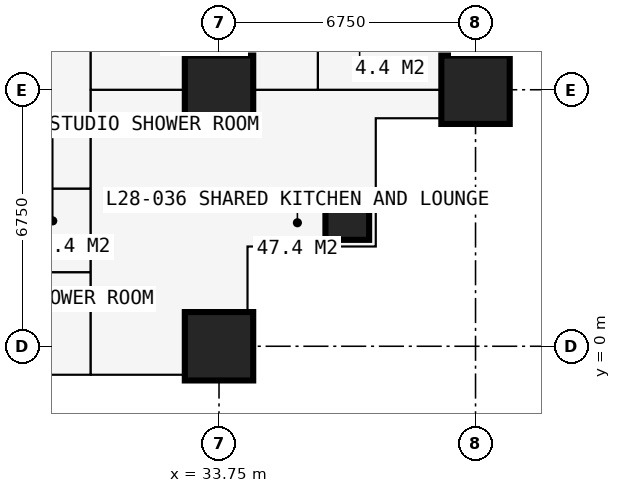
"""IFC4 building model, lengths in metres.
Left out: names, types, materials, properties, quantities, classifications, styles, units other than length and angle.
Written with IfcOpenShell. Run it as: python <this file> out.ifc"""

import sys

from ifc_helpers import new_model, si_unit, direction, frame, frame_2d, origin, origin_2d, place, context, subcontext, project, spatial, rectangle, extrude, element, fill, save


model = new_model("IFC4")
c1 = context("Model", 3, precision=1e-05, world=origin(), true_north=direction((0.0, 1.0)))
c2 = subcontext(c1, "Body", "Model", "MODEL_VIEW")
j1 = project(units=[si_unit("LENGTHUNIT", "METRE"), si_unit("PLANEANGLEUNIT", "RADIAN")], contexts=[c1])
p1 = place(None, origin())
s1 = spatial("IfcSite", under=j1, at=p1, CompositionType="ELEMENT")
p2 = place(p1, origin())
s2 = spatial("IfcBuilding", under=s1, at=p2, CompositionType="ELEMENT")
p3 = place(p2, frame((0.0, 0.0, 105.3)))
s3 = spatial("IfcBuildingStorey", under=s2, at=p3, CompositionType="ELEMENT", Elevation=105.3)
for number, where, z_axis, x_axis in (
    (1, (33.75, 0.0, 0.0), (0.0, 0.0, 1.0), (1.0, 0.0, 0.0)),
    (2, (33.75, 6.75, 0.0), (0.0, 0.0, 1.0), (1.0, 0.0, 0.0)),
):
    element("IfcColumn", number, at=place(p3, frame(where, z_axis=z_axis, x_axis=x_axis)), inside=s3, PredefinedType="COLUMN", context=c2, shape_type="SweptSolid", body=[
        extrude(rectangle(XDim=1.8, YDim=1.8, at=origin_2d()), origin(), (0.0, 0.0, 1.0), 3.6),
    ])
p4 = place(p3, frame((37.125, 3.375, 0.0), z_axis=(0.0, 0.0, 1.0), x_axis=(1.0, 0.0, 0.0)))
e3 = element("IfcColumn", 3, at=p4, inside=s3, PredefinedType="COLUMN", context=c2, shape_type="SweptSolid", body=[
    extrude(rectangle(XDim=1.15, YDim=1.15, at=origin_2d()), origin(), (0.0, 0.0, 1.0), 3.6),
])
p5 = place(p3, frame((40.5, 6.75, 0.0), z_axis=(0.0, 0.0, 1.0), x_axis=(1.0, 0.0, 0.0)))
e4 = element("IfcColumn", 4, at=p5, inside=s3, PredefinedType="COLUMN", context=c2, shape_type="SweptSolid", body=[
    extrude(rectangle(XDim=1.8, YDim=1.8, at=origin_2d()), origin(), (0.0, 0.0, 1.0), 3.6),
])
p6 = place(p3, frame((34.5, -0.75, 0.0), z_axis=(0.0, 0.0, 1.0), x_axis=(0.0, 1.0, 0.0)))
e5 = element("IfcWall", 5, at=p6, inside=s3, PredefinedType="SOLIDWALL", context=c2, shape_type="SweptSolid", body=[
    extrude(rectangle(XDim=3.375, YDim=0.3, at=frame_2d((1.688, 0.0))), origin(), (0.0, 0.0, 1.0), 3.375),
])
p7 = place(p6, frame((1.833, 0.0, 0.9)))
e6 = element("IfcOpeningElement", 6, at=p7, cuts=e5, PredefinedType="OPENING", context=c2, shape_type="SweptSolid", body=[
    extrude(rectangle(XDim=1.2, YDim=1.8, at=frame_2d((0.6, 0.9))), frame((0.0, 0.16, 0.0), z_axis=(0.0, -1.0, 0.0), x_axis=(1.0, 0.0, 0.0)), (0.0, 0.0, 1.0), 0.32),
])
p8 = place(p3, frame((34.5, 2.625, 0.0), z_axis=(0.0, 0.0, 1.0), x_axis=(1.0, 0.0, 0.0)))
e7 = element("IfcWall", 7, at=p8, inside=s3, PredefinedType="SOLIDWALL", context=c2, shape_type="SweptSolid", body=[
    extrude(rectangle(XDim=3.375, YDim=0.3, at=frame_2d((1.688, 0.0))), origin(), (0.0, 0.0, 1.0), 3.375),
])
p9 = place(p8, frame((0.788, 0.0, 0.6)))
e8 = element("IfcOpeningElement", 8, at=p9, cuts=e7, PredefinedType="OPENING", context=c2, shape_type="SweptSolid", body=[
    extrude(rectangle(XDim=1.8, YDim=2.1, at=frame_2d((0.9, 1.05))), frame((0.0, 0.16, 0.0), z_axis=(0.0, -1.0, 0.0), x_axis=(1.0, 0.0, 0.0)), (0.0, 0.0, 1.0), 0.32),
])
p10 = place(p3, frame((37.875, 2.625, 0.0), z_axis=(0.0, 0.0, 1.0), x_axis=(0.0, 1.0, 0.0)))
e9 = element("IfcWall", 9, at=p10, inside=s3, PredefinedType="SOLIDWALL", context=c2, shape_type="SweptSolid", body=[
    extrude(rectangle(XDim=3.375, YDim=0.3, at=frame_2d((1.688, 0.0))), origin(), (0.0, 0.0, 1.0), 3.375),
])
p11 = place(p10, frame((0.788, 0.0, 0.6)))
e10 = element("IfcOpeningElement", 10, at=p11, cuts=e9, PredefinedType="OPENING", context=c2, shape_type="SweptSolid", body=[
    extrude(rectangle(XDim=1.8, YDim=2.1, at=frame_2d((0.9, 1.05))), frame((0.0, 0.16, 0.0), z_axis=(0.0, -1.0, 0.0), x_axis=(1.0, 0.0, 0.0)), (0.0, 0.0, 1.0), 0.32),
])
p12 = place(p3, frame((37.875, 6.0, 0.0), z_axis=(0.0, 0.0, 1.0), x_axis=(1.0, 0.0, 0.0)))
e11 = element("IfcWall", 11, at=p12, inside=s3, PredefinedType="SOLIDWALL", context=c2, shape_type="SweptSolid", body=[
    extrude(rectangle(XDim=3.375, YDim=0.3, at=frame_2d((1.688, 0.0))), origin(), (0.0, 0.0, 1.0), 3.375),
])
p13 = place(p12, frame((0.343, 0.0, 0.9)))
e12 = element("IfcOpeningElement", 12, at=p13, cuts=e11, PredefinedType="OPENING", context=c2, shape_type="SweptSolid", body=[
    extrude(rectangle(XDim=1.2, YDim=1.8, at=frame_2d((0.6, 0.9))), frame((0.0, 0.16, 0.0), z_axis=(0.0, -1.0, 0.0), x_axis=(1.0, 0.0, 0.0)), (0.0, 0.0, 1.0), 0.32),
])
p14 = place(p3, frame((6.75, 4.15, 0.0), z_axis=(0.0, 0.0, 1.0), x_axis=(1.0, 0.0, 0.0)))
e13 = element("IfcWall", 13, at=p14, inside=s3, PredefinedType="PARTITIONING", context=c2, shape_type="SweptSolid", body=[
    extrude(rectangle(XDim=23.625, YDim=0.1, at=frame_2d((11.812, 0.0))), origin(), (0.0, 0.0, 1.0), 3.375),
])
p15 = place(p14, frame((0.2, 0.0, 0.0)))
e14 = element("IfcOpeningElement", 14, at=p15, cuts=e13, PredefinedType="OPENING", context=c2, shape_type="SweptSolid", body=[
    extrude(rectangle(XDim=0.95, YDim=2.2, at=frame_2d((0.475, 1.1))), frame((0.0, 0.06, 0.0), z_axis=(0.0, -1.0, 0.0), x_axis=(1.0, 0.0, 0.0)), (0.0, 0.0, 1.0), 0.12),
])
p16 = place(p14, frame((3.625, 0.0, 0.0)))
e15 = element("IfcOpeningElement", 15, at=p16, cuts=e13, PredefinedType="OPENING", context=c2, shape_type="SweptSolid", body=[
    extrude(rectangle(XDim=0.95, YDim=2.2, at=frame_2d((0.475, 1.1))), frame((0.0, 0.06, 0.0), z_axis=(0.0, -1.0, 0.0), x_axis=(1.0, 0.0, 0.0)), (0.0, 0.0, 1.0), 0.12),
])
p17 = place(p14, frame((6.95, 0.0, 0.0)))
e16 = element("IfcOpeningElement", 16, at=p17, cuts=e13, PredefinedType="OPENING", context=c2, shape_type="SweptSolid", body=[
    extrude(rectangle(XDim=0.95, YDim=2.2, at=frame_2d((0.475, 1.1))), frame((0.0, 0.06, 0.0), z_axis=(0.0, -1.0, 0.0), x_axis=(1.0, 0.0, 0.0)), (0.0, 0.0, 1.0), 0.12),
])
p18 = place(p14, frame((10.375, 0.0, 0.0)))
e17 = element("IfcOpeningElement", 17, at=p18, cuts=e13, PredefinedType="OPENING", context=c2, shape_type="SweptSolid", body=[
    extrude(rectangle(XDim=0.95, YDim=2.2, at=frame_2d((0.475, 1.1))), frame((0.0, 0.06, 0.0), z_axis=(0.0, -1.0, 0.0), x_axis=(1.0, 0.0, 0.0)), (0.0, 0.0, 1.0), 0.12),
])
p19 = place(p14, frame((13.75, 0.0, 0.0)))
e18 = element("IfcOpeningElement", 18, at=p19, cuts=e13, PredefinedType="OPENING", context=c2, shape_type="SweptSolid", body=[
    extrude(rectangle(XDim=0.95, YDim=2.2, at=frame_2d((0.475, 1.1))), frame((0.0, 0.06, 0.0), z_axis=(0.0, -1.0, 0.0), x_axis=(1.0, 0.0, 0.0)), (0.0, 0.0, 1.0), 0.12),
])
p20 = place(p14, frame((17.125, 0.0, 0.0)))
e19 = element("IfcOpeningElement", 19, at=p20, cuts=e13, PredefinedType="OPENING", context=c2, shape_type="SweptSolid", body=[
    extrude(rectangle(XDim=0.95, YDim=2.2, at=frame_2d((0.475, 1.1))), frame((0.0, 0.06, 0.0), z_axis=(0.0, -1.0, 0.0), x_axis=(1.0, 0.0, 0.0)), (0.0, 0.0, 1.0), 0.12),
])
p21 = place(p14, frame((20.5, 0.0, 0.0)))
e20 = element("IfcOpeningElement", 20, at=p21, cuts=e13, PredefinedType="OPENING", context=c2, shape_type="SweptSolid", body=[
    extrude(rectangle(XDim=0.95, YDim=2.2, at=frame_2d((0.475, 1.1))), frame((0.0, 0.06, 0.0), z_axis=(0.0, -1.0, 0.0), x_axis=(1.0, 0.0, 0.0)), (0.0, 0.0, 1.0), 0.12),
])
p22 = place(p3, frame((22.988, 5.65, 0.0), z_axis=(0.0, 0.0, 1.0), x_axis=(1.0, 0.0, 0.0)))
e21 = element("IfcWall", 21, at=p22, inside=s3, PredefinedType="PARTITIONING", context=c2, shape_type="SweptSolid", body=[
    extrude(rectangle(XDim=7.387, YDim=0.15, at=frame_2d((3.694, 0.0))), origin(), (0.0, 0.0, 1.0), 3.375),
])
p23 = place(p22, frame((2.15, 0.0, 0.0)))
e22 = element("IfcOpeningElement", 22, at=p23, cuts=e21, PredefinedType="OPENING", context=c2, shape_type="SweptSolid", body=[
    extrude(rectangle(XDim=0.95, YDim=2.2, at=frame_2d((0.475, 1.1))), frame((0.0, 0.085, 0.0), z_axis=(0.0, -1.0, 0.0), x_axis=(1.0, 0.0, 0.0)), (0.0, 0.0, 1.0), 0.17),
])
p24 = place(p3, frame((28.375, 1.95, 0.0), z_axis=(0.0, 0.0, 1.0), x_axis=(1.0, 0.0, 0.0)))
e23 = element("IfcWall", 23, at=p24, inside=s3, PredefinedType="PARTITIONING", context=c2, shape_type="SweptSolid", body=[
    extrude(rectangle(XDim=2.0, YDim=0.1, at=frame_2d((1.0, 0.0))), origin(), (0.0, 0.0, 1.0), 3.375),
])
p25 = place(p3, frame((30.375, -0.734, 0.0), z_axis=(0.0, 0.0, 1.0), x_axis=(0.0, 1.0, 0.0)))
e24 = element("IfcWall", 24, at=p25, inside=s3, PredefinedType="PARTITIONING", context=c2, shape_type="SweptSolid", body=[
    extrude(rectangle(XDim=12.034, YDim=0.15, at=frame_2d((6.017, 0.0))), origin(), (0.0, 0.0, 1.0), 3.375),
])
p26 = place(p3, frame((30.375, 6.75, 0.0), z_axis=(0.0, 0.0, 1.0), x_axis=(1.0, 0.0, 0.0)))
e25 = element("IfcWall", 25, at=p26, inside=s3, PredefinedType="PARTITIONING", context=c2, shape_type="SweptSolid", body=[
    extrude(rectangle(XDim=10.859, YDim=0.15, at=frame_2d((5.429, 0.0))), origin(), (0.0, 0.0, 1.0), 2.877),
])
p27 = place(p26, frame((1.45, 0.0, 0.0)))
e26 = element("IfcOpeningElement", 26, at=p27, cuts=e25, PredefinedType="OPENING", context=c2, shape_type="SweptSolid", body=[
    extrude(rectangle(XDim=1.0, YDim=2.2, at=frame_2d((0.5, 1.1))), frame((0.0, 0.085, 0.0), z_axis=(0.0, -1.0, 0.0), x_axis=(1.0, 0.0, 0.0)), (0.0, 0.0, 1.0), 0.17),
])
p28 = place(p3, frame((36.35, 6.75, 0.0), z_axis=(0.0, 0.0, 1.0), x_axis=(0.0, 1.0, 0.0)))
e27 = element("IfcWall", 27, at=p28, inside=s3, PredefinedType="PARTITIONING", context=c2, shape_type="SweptSolid", body=[
    extrude(rectangle(XDim=20.25, YDim=0.15, at=frame_2d((10.125, 0.0))), origin(), (0.0, 0.0, 1.0), 3.375),
])
p29 = place(p28, frame((0.2, 0.0, 0.0)))
e28 = element("IfcOpeningElement", 28, at=p29, cuts=e27, PredefinedType="OPENING", context=c2, shape_type="SweptSolid", body=[
    extrude(rectangle(XDim=0.95, YDim=2.2, at=frame_2d((0.475, 1.1))), frame((0.0, 0.085, 0.0), z_axis=(0.0, -1.0, 0.0), x_axis=(1.0, 0.0, 0.0)), (0.0, 0.0, 1.0), 0.17),
])
p30 = place(p28, frame((15.1, 0.0, 0.0)))
e29 = element("IfcOpeningElement", 29, at=p30, cuts=e27, PredefinedType="OPENING", context=c2, shape_type="SweptSolid", body=[
    extrude(rectangle(XDim=0.95, YDim=2.2, at=frame_2d((0.475, 1.1))), frame((0.0, 0.085, 0.0), z_axis=(0.0, -1.0, 0.0), x_axis=(1.0, 0.0, 0.0)), (0.0, 0.0, 1.0), 0.17),
])
p31 = place(p28, frame((8.35, 0.0, 0.0)))
e30 = element("IfcOpeningElement", 30, at=p31, cuts=e27, PredefinedType="OPENING", context=c2, shape_type="SweptSolid", body=[
    extrude(rectangle(XDim=0.95, YDim=2.2, at=frame_2d((0.475, 1.1))), frame((0.0, 0.085, 0.0), z_axis=(0.0, -1.0, 0.0), x_axis=(1.0, 0.0, 0.0)), (0.0, 0.0, 1.0), 0.17),
])
p32 = place(p28, frame((3.575, 0.0, 0.0)))
e31 = element("IfcOpeningElement", 31, at=p32, cuts=e27, PredefinedType="OPENING", context=c2, shape_type="SweptSolid", body=[
    extrude(rectangle(XDim=0.95, YDim=2.2, at=frame_2d((0.475, 1.1))), frame((0.0, 0.085, 0.0), z_axis=(0.0, -1.0, 0.0), x_axis=(1.0, 0.0, 0.0)), (0.0, 0.0, 1.0), 0.17),
])
p33 = place(p7, origin())
e32 = element("IfcWindow", 32, at=p33, inside=s3, PartitioningType="SINGLE_PANEL", PredefinedType="WINDOW", context=c2, shape_type="SweptSolid", body=[
    extrude(rectangle(XDim=1.2, YDim=1.8, at=frame_2d((0.6, 0.9))), frame((0.0, 0.03, 0.0), z_axis=(0.0, -1.0, 0.0), x_axis=(1.0, 0.0, 0.0)), (0.0, 0.0, 1.0), 0.06),
])
fill(e6, e32)
p34 = place(p9, origin())
e33 = element("IfcWindow", 33, at=p34, inside=s3, PartitioningType="SINGLE_PANEL", PredefinedType="WINDOW", context=c2, shape_type="SweptSolid", body=[
    extrude(rectangle(XDim=1.8, YDim=2.1, at=frame_2d((0.9, 1.05))), frame((0.0, 0.03, 0.0), z_axis=(0.0, -1.0, 0.0), x_axis=(1.0, 0.0, 0.0)), (0.0, 0.0, 1.0), 0.06),
])
fill(e8, e33)
p35 = place(p11, origin())
e34 = element("IfcWindow", 34, at=p35, inside=s3, PartitioningType="SINGLE_PANEL", PredefinedType="WINDOW", context=c2, shape_type="SweptSolid", body=[
    extrude(rectangle(XDim=1.8, YDim=2.1, at=frame_2d((0.9, 1.05))), frame((0.0, 0.03, 0.0), z_axis=(0.0, -1.0, 0.0), x_axis=(1.0, 0.0, 0.0)), (0.0, 0.0, 1.0), 0.06),
])
fill(e10, e34)
p36 = place(p13, origin())
e35 = element("IfcWindow", 35, at=p36, inside=s3, PartitioningType="SINGLE_PANEL", PredefinedType="WINDOW", context=c2, shape_type="SweptSolid", body=[
    extrude(rectangle(XDim=1.2, YDim=1.8, at=frame_2d((0.6, 0.9))), frame((0.0, 0.03, 0.0), z_axis=(0.0, -1.0, 0.0), x_axis=(1.0, 0.0, 0.0)), (0.0, 0.0, 1.0), 0.06),
])
fill(e12, e35)
p37 = place(p27, origin())
e36 = element("IfcDoor", 36, at=p37, inside=s3, OperationType="SINGLE_SWING_LEFT", PredefinedType="DOOR", context=c2, shape_type="SweptSolid", body=[
    extrude(rectangle(XDim=1.0, YDim=2.2, at=frame_2d((0.5, 1.1))), frame((0.0, 0.025, 0.0), z_axis=(0.0, -1.0, 0.0), x_axis=(1.0, 0.0, 0.0)), (0.0, 0.0, 1.0), 0.05),
])
fill(e26, e36)
p38 = place(p29, origin())
e37 = element("IfcDoor", 37, at=p38, inside=s3, OperationType="SINGLE_SWING_LEFT", PredefinedType="DOOR", context=c2, shape_type="SweptSolid", body=[
    extrude(rectangle(XDim=0.95, YDim=2.2, at=frame_2d((0.475, 1.1))), frame((0.0, 0.025, 0.0), z_axis=(0.0, -1.0, 0.0), x_axis=(1.0, 0.0, 0.0)), (0.0, 0.0, 1.0), 0.05),
])
fill(e28, e37)
save(model, sys.argv[1])
